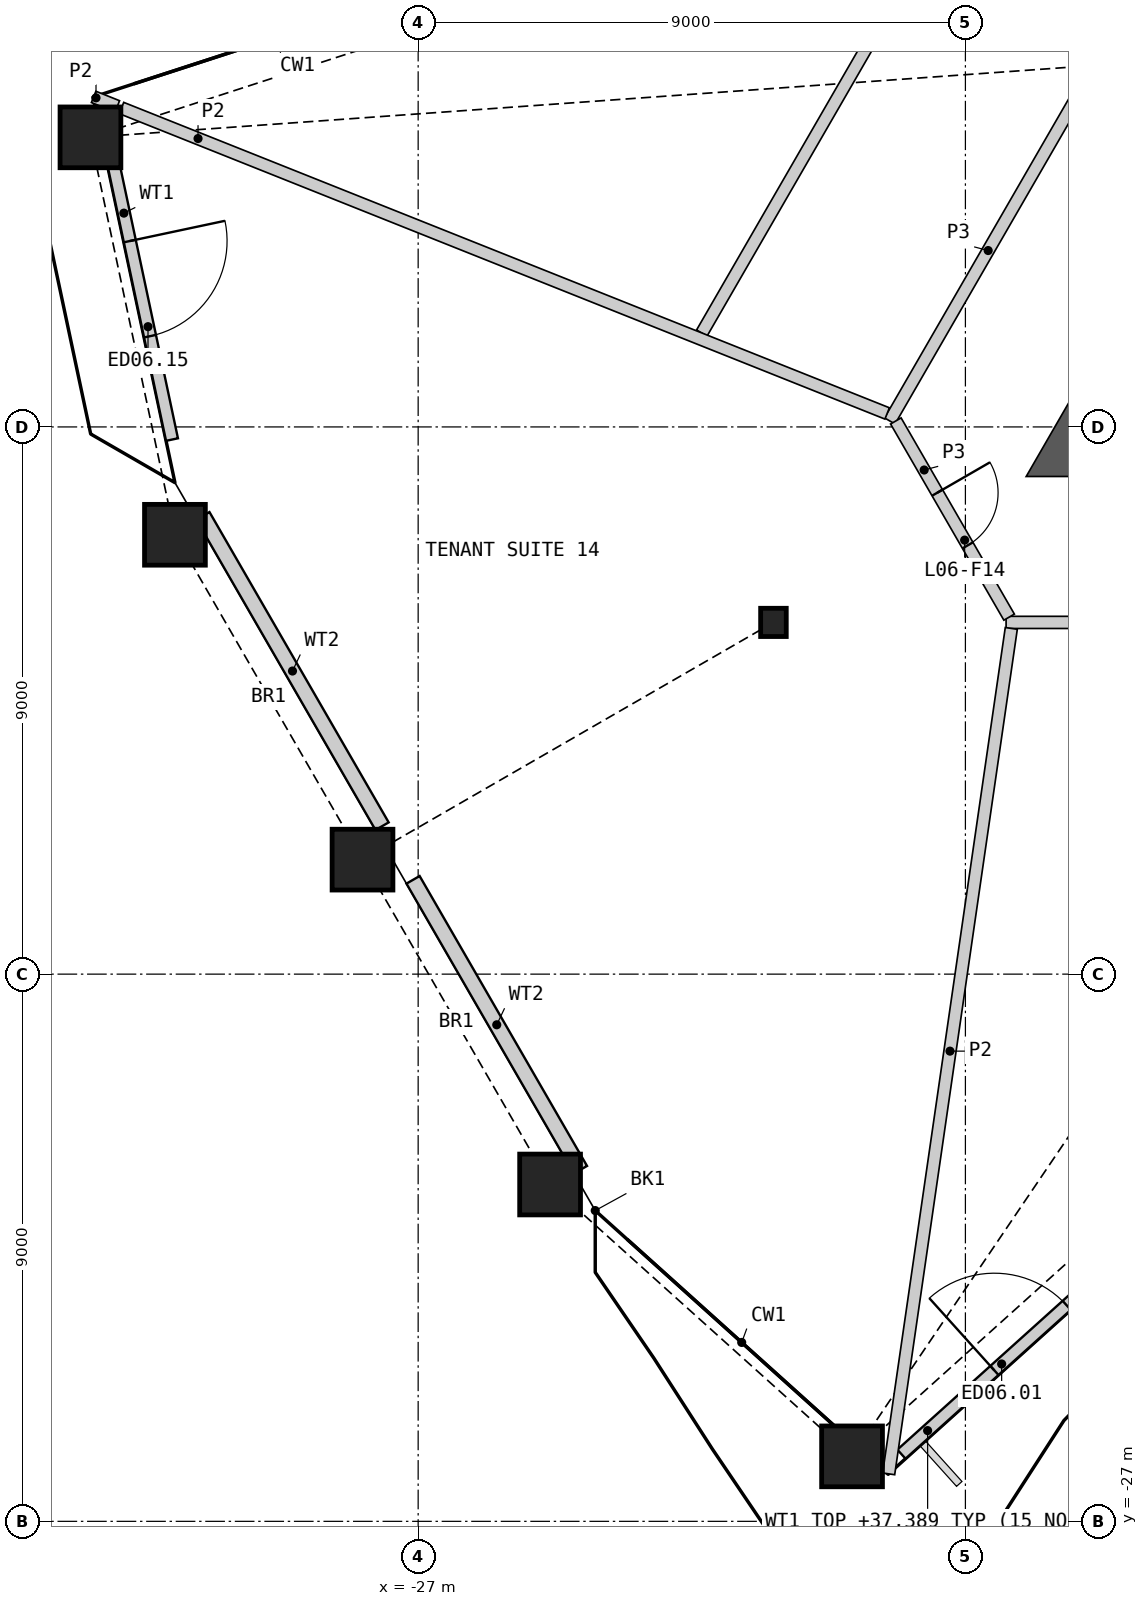
"""IFC4 building model, lengths in metres.
Left out: names, types, materials, properties, quantities, classifications, styles, units other than length and angle.
Written with IfcOpenShell. Run it as: python <this file> out.ifc"""

import sys

from ifc_helpers import new_model, si_unit, direction, frame, frame_2d, origin, origin_2d, place, context, subcontext, project, spatial, polyline, rectangle, hollow_rectangle, i_section, outline, extrude, element, fill, save


model = new_model("IFC4")
c1 = context("Model", 3, precision=1e-05, world=origin(), true_north=direction((0.0, 1.0)))
c2 = subcontext(c1, "Body", "Model", "MODEL_VIEW")
j1 = project(units=[si_unit("LENGTHUNIT", "METRE"), si_unit("PLANEANGLEUNIT", "RADIAN")], contexts=[c1])
p1 = place(None, origin())
s1 = spatial("IfcSite", under=j1, at=p1, CompositionType="ELEMENT")
p2 = place(p1, origin())
s2 = spatial("IfcBuilding", under=s1, at=p2, CompositionType="ELEMENT")
p3 = place(p2, frame((0.0, 0.0, 34.2)))
s3 = spatial("IfcBuildingStorey", under=s2, at=p3, CompositionType="ELEMENT", Elevation=34.2)
for number, where, z_axis, x_axis in (
    (1, (-24.83, -21.46, 0.0), (0.0, 0.0, 1.0), (1.0, 0.0, 0.0)),
    (2, (-19.864, -25.931, 0.0), (0.0, 0.0, 1.0), (1.0, 0.0, 0.0)),
    (3, (-32.389, -4.237, 0.0), (0.0, 0.0, 1.0), (1.0, 0.0, 0.0)),
    (4, (-31.0, -10.774, 0.0), (0.0, 0.0, 1.0), (1.0, 0.0, 0.0)),
    (5, (-27.915, -16.117, 0.0), (0.0, 0.0, 1.0), (1.0, 0.0, 0.0)),
):
    element("IfcColumn", number, at=place(p3, frame(where, z_axis=z_axis, x_axis=x_axis)), inside=s3, PredefinedType="COLUMN", context=c2, shape_type="SweptSolid", body=[
        extrude(hollow_rectangle(XDim=1.0, YDim=1.0, WallThickness=0.07, at=origin_2d()), origin(), (0.0, 0.0, 1.0), 4.2),
    ])
p4 = place(p3, frame((-21.157, -12.215, 0.0), z_axis=(0.0, 0.0, 1.0), x_axis=(1.0, 0.0, 0.0)))
e6 = element("IfcColumn", 6, at=p4, inside=s3, PredefinedType="COLUMN", context=c2, shape_type="SweptSolid", body=[
    extrude(i_section(OverallWidth=0.421, OverallDepth=0.465, WebThickness=0.045, FlangeThickness=0.072, at=origin_2d()), origin(), (0.0, 0.0, 1.0), 4.2),
])
p5 = place(p3, frame((-19.052, -25.895, 0.0), z_axis=(0.0, 0.0, 1.0), x_axis=(0.743145322323, 0.669130054556, 0.0)))
e7 = element("IfcWall", 7, at=p5, inside=s3, PredefinedType="SOLIDWALL", context=c2, shape_type="SweptSolid", body=[
    extrude(rectangle(XDim=5.792, YDim=0.2, at=frame_2d((2.896, 0.0))), origin(), (0.0, 0.0, 1.0), 3.189),
])
p6 = place(p5, frame((2.057, 0.0, 0.0)))
e8 = element("IfcOpeningElement", 8, at=p6, cuts=e7, PredefinedType="OPENING", context=c2, shape_type="SweptSolid", body=[
    extrude(rectangle(XDim=1.6, YDim=2.4, at=frame_2d((0.8, 1.2))), frame((0.0, 0.11, 0.0), z_axis=(0.0, -1.0, 0.0), x_axis=(1.0, 0.0, 0.0)), (0.0, 0.0, 1.0), 0.22),
])
p7 = place(p3, frame((-32.104, -4.242, 0.0), z_axis=(0.0, 0.0, 1.0), x_axis=(0.207903044531, -0.978149438519, 0.0)))
e9 = element("IfcWall", 9, at=p7, inside=s3, PredefinedType="SOLIDWALL", context=c2, shape_type="SweptSolid", body=[
    extrude(rectangle(XDim=5.076, YDim=0.2, at=frame_2d((2.538, 0.0))), origin(), (0.0, 0.0, 1.0), 3.189),
])
p8 = place(p7, frame((1.738, 0.0, 0.0)))
e10 = element("IfcOpeningElement", 10, at=p8, cuts=e9, PredefinedType="OPENING", context=c2, shape_type="SweptSolid", body=[
    extrude(rectangle(XDim=1.6, YDim=2.4, at=frame_2d((0.8, 1.2))), frame((0.0, 0.11, 0.0), z_axis=(0.0, -1.0, 0.0), x_axis=(1.0, 0.0, 0.0)), (0.0, 0.0, 1.0), 0.22),
])
p9 = place(p3, frame((-30.54, -10.463, 0.0), z_axis=(0.0, 0.0, 1.0), x_axis=(0.500010498135, -0.866019342599, 0.0)))
e11 = element("IfcWall", 11, at=p9, inside=s3, PredefinedType="SOLIDWALL", context=c2, shape_type="SweptSolid", body=[
    extrude(rectangle(XDim=5.894, YDim=0.25, at=frame_2d((2.947, 0.0))), origin(), (0.0, 0.0, 1.0), 3.189),
])
p10 = place(p3, frame((-27.084, -16.449, 0.0), z_axis=(0.0, 0.0, 1.0), x_axis=(0.500006469283, -0.86602166871, 0.0)))
e12 = element("IfcWall", 12, at=p10, inside=s3, PredefinedType="SOLIDWALL", context=c2, shape_type="SweptSolid", body=[
    extrude(rectangle(XDim=5.506, YDim=0.25, at=frame_2d((2.753, 0.0))), origin(), (0.0, 0.0, 1.0), 3.189),
])
p11 = place(p3, origin())
e13 = element("IfcWall", 13, at=p11, inside=s3, PredefinedType="SHEAR", context=c2, shape_type="SweptSolid", body=[
    extrude(outline(polyline([(-16.221, -8.465), (-15.441, -8.915), (-15.441, -9.815), (-17.0, -9.815), (-16.221, -8.465)])), origin(), (0.0, 0.0, 1.0), 3.8),
])
p12 = place(p3, frame((-17.331, -12.215, 0.0), z_axis=(0.0, 0.0, 1.0), x_axis=(1.0, 0.0, 0.0)))
e14 = element("IfcWall", 14, at=p12, inside=s3, PredefinedType="PARTITIONING", context=c2, shape_type="SweptSolid", body=[
    extrude(rectangle(XDim=6.51, YDim=0.2, at=frame_2d((3.255, 0.0))), origin(), (0.0, 0.0, 1.0), 3.8),
])
p13 = place(p12, frame((2.455, 0.0, 0.0)))
e15 = element("IfcOpeningElement", 15, at=p13, cuts=e14, PredefinedType="OPENING", context=c2, shape_type="SweptSolid", body=[
    extrude(rectangle(XDim=1.8, YDim=2.1, at=frame_2d((0.9, 1.05))), frame((0.0, 0.11, 0.0), z_axis=(0.0, -1.0, 0.0), x_axis=(1.0, 0.0, 0.0)), (0.0, 0.0, 1.0), 0.22),
])
p14 = place(p3, frame((-19.244, -8.902, 0.0), z_axis=(0.0, 0.0, 1.0), x_axis=(0.499984737558, 0.86603421538, 0.0)))
e16 = element("IfcWall", 16, at=p14, inside=s3, PredefinedType="PARTITIONING", context=c2, shape_type="SweptSolid", body=[
    extrude(rectangle(XDim=6.473, YDim=0.2, at=frame_2d((3.236, 0.0))), origin(), (0.0, 0.0, 1.0), 3.8),
])
p15 = place(p3, frame((-19.144, -8.902, 0.0), z_axis=(0.0, 0.0, 1.0), x_axis=(0.499958791762, -0.866049194065, 0.0)))
e17 = element("IfcWall", 17, at=p15, inside=s3, PredefinedType="PARTITIONING", context=c2, shape_type="SweptSolid", body=[
    extrude(rectangle(XDim=3.726, YDim=0.2, at=frame_2d((1.863, 0.0))), origin(), (0.0, 0.0, 1.0), 3.8),
])
p16 = place(p15, frame((1.363, 0.0, 0.0)))
e18 = element("IfcOpeningElement", 18, at=p16, cuts=e17, PredefinedType="OPENING", context=c2, shape_type="SweptSolid", body=[
    extrude(rectangle(XDim=1.0, YDim=2.1, at=frame_2d((0.5, 1.05))), frame((0.0, 0.11, 0.0), z_axis=(0.0, -1.0, 0.0), x_axis=(1.0, 0.0, 0.0)), (0.0, 0.0, 1.0), 0.22),
])
p17 = place(p3, frame((-22.335, -7.455, 0.0), z_axis=(0.0, 0.0, 1.0), x_axis=(0.499997414609, 0.866026896456, 0.0)))
e19 = element("IfcWall", 19, at=p17, inside=s3, PredefinedType="PARTITIONING", context=c2, shape_type="SweptSolid", body=[
    extrude(rectangle(XDim=17.524, YDim=0.2, at=frame_2d((8.762, 0.0))), origin(), (0.0, 0.0, 1.0), 2.885),
])
p18 = place(p17, frame((7.584, 0.0, 0.0)))
e20 = element("IfcOpeningElement", 20, at=p18, cuts=e19, PredefinedType="OPENING", context=c2, shape_type="SweptSolid", body=[
    extrude(rectangle(XDim=0.95, YDim=2.1, at=frame_2d((0.475, 1.05))), frame((0.0, 0.11, 0.0), z_axis=(0.0, -1.0, 0.0), x_axis=(1.0, 0.0, 0.0)), (0.0, 0.0, 1.0), 0.22),
])
p19 = place(p3, frame((-19.262, -26.219, 0.0), z_axis=(0.0, 0.0, 1.0), x_axis=(0.143525263071, 0.989646653539, 0.0)))
e21 = element("IfcWall", 21, at=p19, inside=s3, PredefinedType="PARTITIONING", context=c2, shape_type="SweptSolid", body=[
    extrude(rectangle(XDim=14.051, YDim=0.2, at=frame_2d((7.025, 0.0))), origin(), (0.0, 0.0, 1.0), 2.885),
])
p20 = place(p3, frame((-31.879, -3.754, 0.0), z_axis=(0.0, 0.0, 1.0), x_axis=(0.928821541656, -0.370527385973, 0.0)))
e22 = element("IfcWall", 22, at=p20, inside=s3, PredefinedType="PARTITIONING", context=c2, shape_type="SweptSolid", body=[
    extrude(rectangle(XDim=13.558, YDim=0.2, at=frame_2d((6.779, 0.0))), origin(), (0.0, 0.0, 1.0), 2.885),
])
p21 = place(p3, frame((-32.337, -3.572, 0.0), z_axis=(0.0, 0.0, 1.0), x_axis=(0.928757356094, -0.370688243003, 0.0)))
e23 = element("IfcWall", 23, at=p21, inside=s3, PredefinedType="PARTITIONING", context=c2, shape_type="SweptSolid", body=[
    extrude(rectangle(XDim=0.419, YDim=0.2, at=frame_2d((0.21, 0.0))), origin(), (0.0, 0.0, 1.0), 2.885),
])
p22 = place(p6, origin())
e24 = element("IfcDoor", 24, at=p22, inside=s3, OperationType="DOUBLE_DOOR_SINGLE_SWING", PredefinedType="DOOR", context=c2, shape_type="SweptSolid", body=[
    extrude(rectangle(XDim=1.6, YDim=2.4, at=frame_2d((0.8, 1.2))), frame((0.0, 0.025, 0.0), z_axis=(0.0, -1.0, 0.0), x_axis=(1.0, 0.0, 0.0)), (0.0, 0.0, 1.0), 0.05),
])
fill(e8, e24)
p23 = place(p8, origin())
e25 = element("IfcDoor", 25, at=p23, inside=s3, OperationType="DOUBLE_DOOR_SINGLE_SWING", PredefinedType="DOOR", context=c2, shape_type="SweptSolid", body=[
    extrude(rectangle(XDim=1.6, YDim=2.4, at=frame_2d((0.8, 1.2))), frame((0.0, 0.025, 0.0), z_axis=(0.0, -1.0, 0.0), x_axis=(1.0, 0.0, 0.0)), (0.0, 0.0, 1.0), 0.05),
])
fill(e10, e25)
p24 = place(p16, origin())
e26 = element("IfcDoor", 26, at=p24, inside=s3, OperationType="SINGLE_SWING_LEFT", PredefinedType="DOOR", context=c2, shape_type="SweptSolid", body=[
    extrude(rectangle(XDim=1.0, YDim=2.1, at=frame_2d((0.5, 1.05))), frame((0.0, 0.025, 0.0), z_axis=(0.0, -1.0, 0.0), x_axis=(1.0, 0.0, 0.0)), (0.0, 0.0, 1.0), 0.05),
])
fill(e18, e26)
save(model, sys.argv[1])
